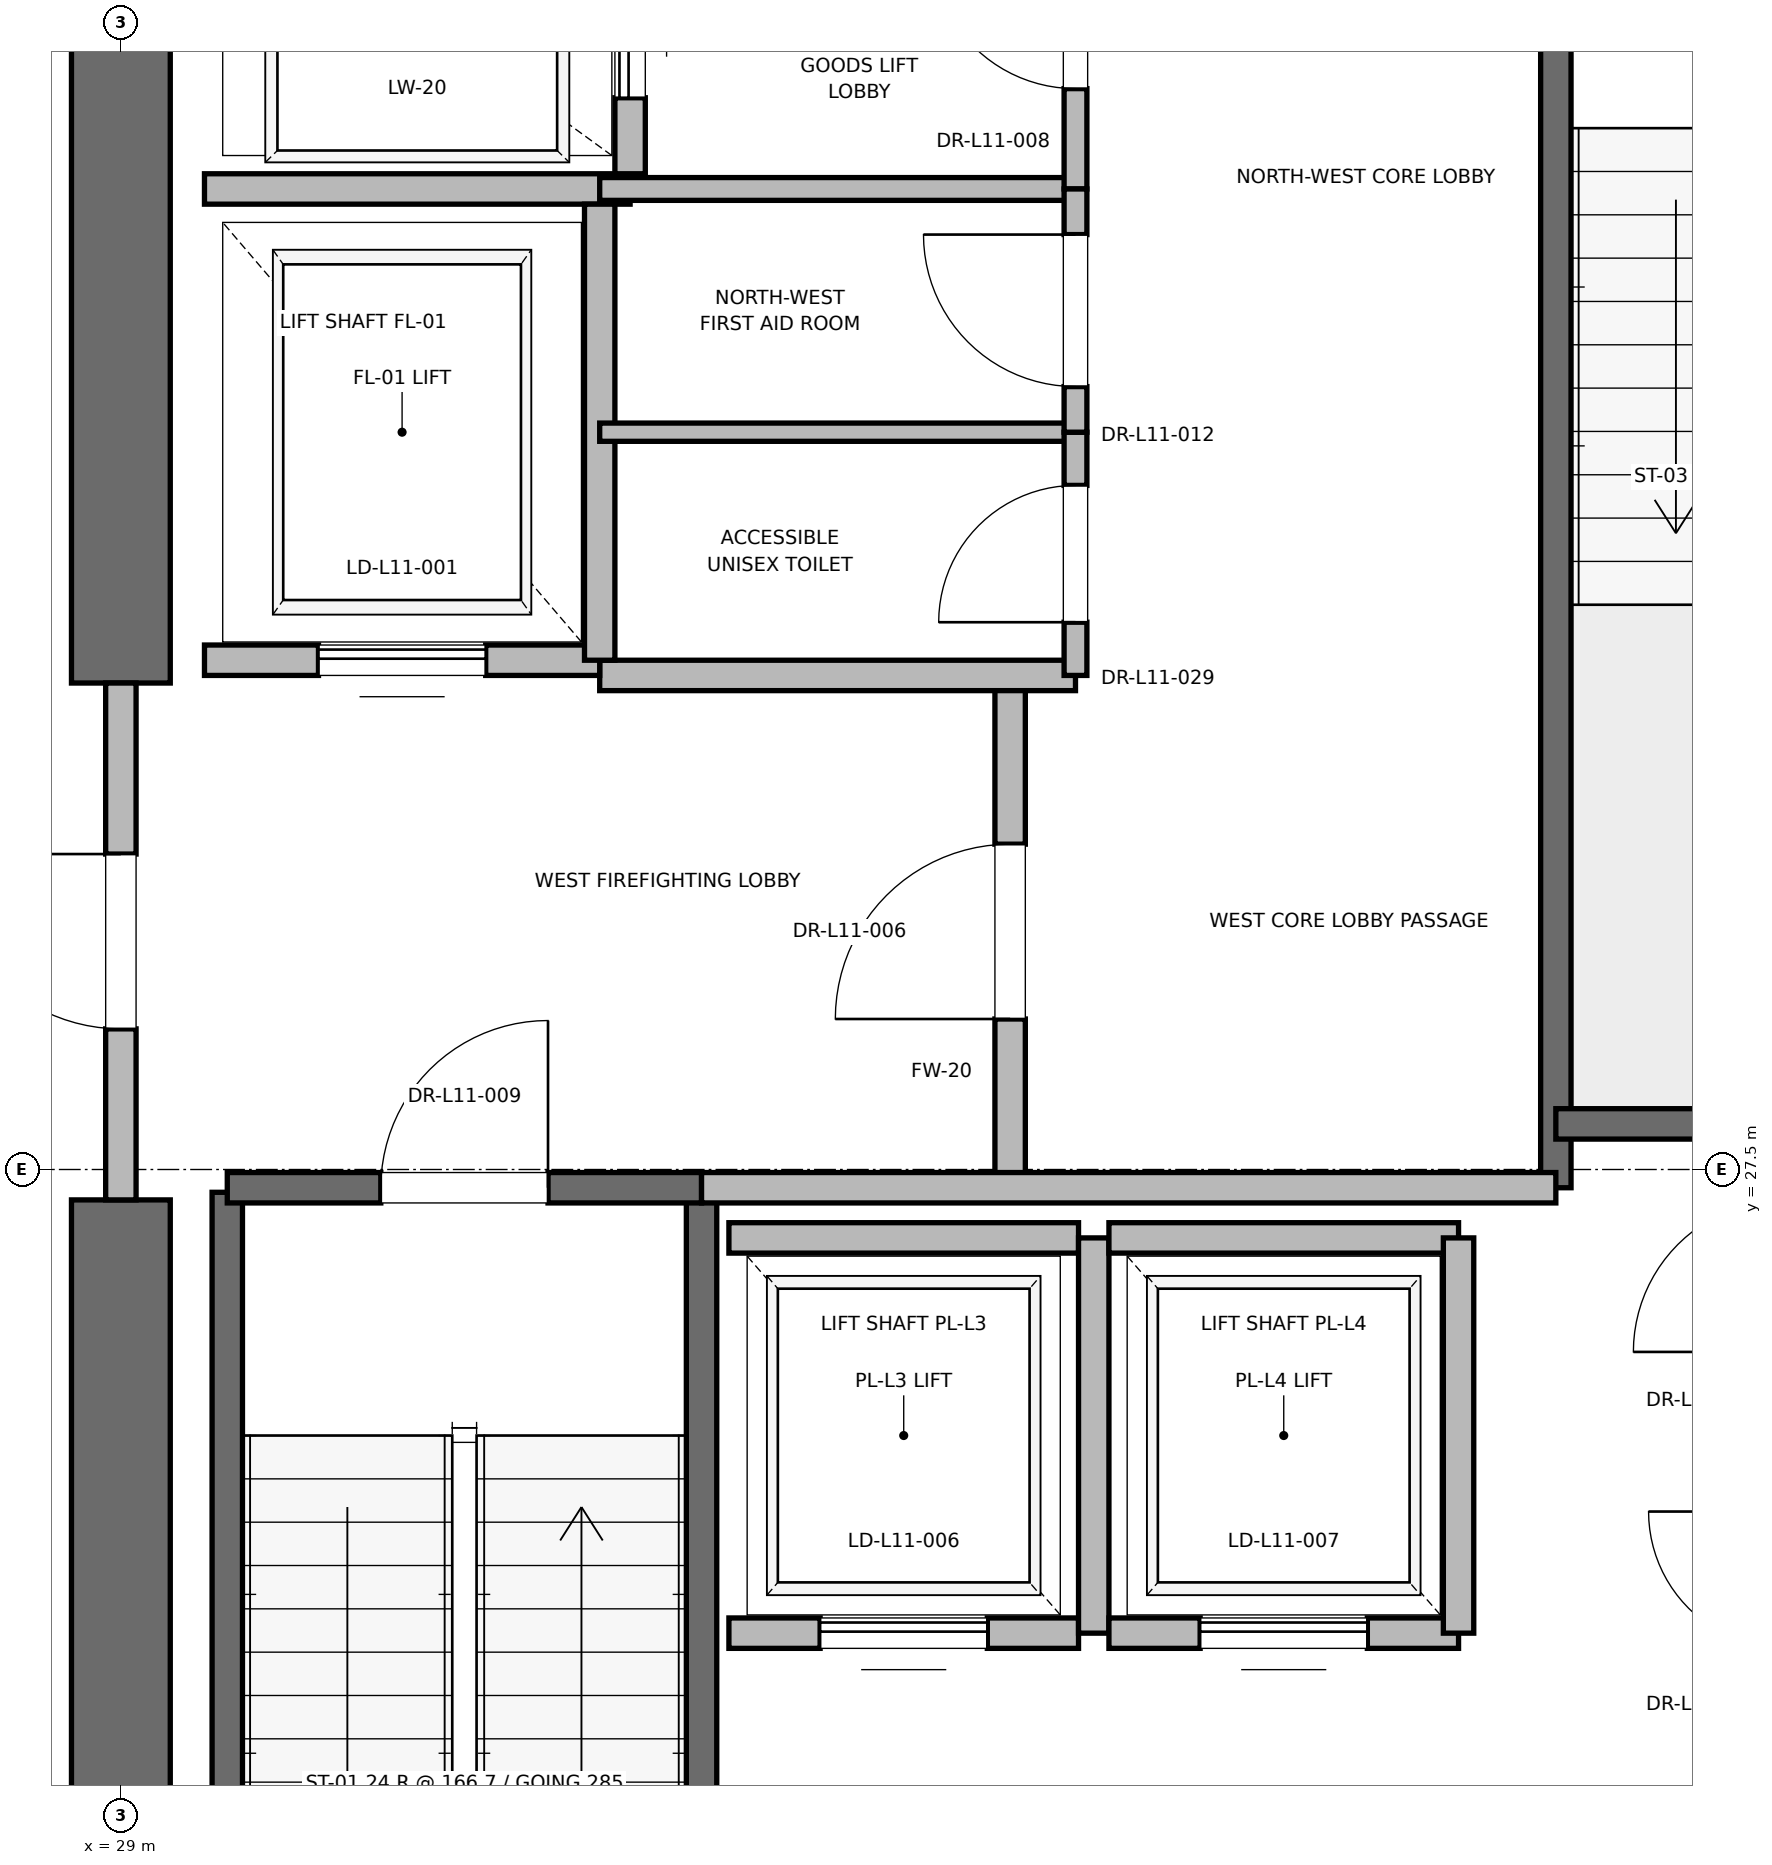
"""IFC4 building model, lengths in metres.
Left out: names, types, materials, properties, quantities, classifications, styles, units other than length and angle.
Written with IfcOpenShell. Run it as: python <this file> out.ifc"""

import sys

from ifc_helpers import new_model, si_unit, direction, frame, frame_2d, origin, place, context, subcontext, project, spatial, rectangle, extrude, element, fill, save


model = new_model("IFC4")
c1 = context("Model", 3, precision=1e-05, world=origin(), true_north=direction((0.0, 1.0)))
c2 = subcontext(c1, "Body", "Model", "MODEL_VIEW")
j1 = project(units=[si_unit("LENGTHUNIT", "METRE"), si_unit("PLANEANGLEUNIT", "RADIAN")], contexts=[c1])
p1 = place(None, origin())
s1 = spatial("IfcSite", under=j1, at=p1, CompositionType="ELEMENT")
p2 = place(p1, origin())
s2 = spatial("IfcBuilding", under=s1, at=p2, CompositionType="ELEMENT")
p3 = place(p2, frame((0.0, 0.0, 51.6)))
s3 = spatial("IfcBuildingStorey", under=s2, at=p3, CompositionType="ELEMENT", Elevation=51.6)
p4 = place(p3, frame((29.0, 18.5, 0.0), z_axis=(0.0, 0.0, 1.0), x_axis=(0.0, 1.0, 0.0)))
e1 = element("IfcWall", 1, at=p4, inside=s3, PredefinedType="SHEAR", context=c2, shape_type="SweptSolid", body=[
    extrude(rectangle(XDim=8.8, YDim=0.65, at=frame_2d((4.4, 0.0))), origin(), (0.0, 0.0, 1.0), 3.76),
])
p5 = place(p3, frame((29.0, 30.7, 0.0), z_axis=(0.0, 0.0, 1.0), x_axis=(0.0, 1.0, 0.0)))
e2 = element("IfcWall", 2, at=p5, inside=s3, PredefinedType="SHEAR", context=c2, shape_type="SweptSolid", body=[
    extrude(rectangle(XDim=5.8, YDim=0.65, at=frame_2d((2.9, 0.0))), origin(), (0.0, 0.0, 1.0), 3.76),
])
p6 = place(p3, frame((29.7, 19.2, 0.0), z_axis=(0.0, 0.0, 1.0), x_axis=(0.0, 1.0, 0.0)))
e3 = element("IfcWall", 3, at=p6, inside=s3, PredefinedType="SOLIDWALL", context=c2, shape_type="SweptSolid", body=[
    extrude(rectangle(XDim=8.15, YDim=0.2, at=frame_2d((4.075, 0.0))), origin(), (0.0, 0.0, 1.0), 3.76),
])
p7 = place(p3, frame((32.82, 18.6, 0.0), z_axis=(0.0, 0.0, 1.0), x_axis=(0.0, 1.0, 0.0)))
e4 = element("IfcWall", 4, at=p7, inside=s3, PredefinedType="SOLIDWALL", context=c2, shape_type="SweptSolid", body=[
    extrude(rectangle(XDim=8.78, YDim=0.2, at=frame_2d((4.39, 0.0))), origin(), (0.0, 0.0, 1.0), 3.76),
])
p8 = place(p3, frame((29.7, 27.38, 0.0), z_axis=(0.0, 0.0, 1.0), x_axis=(1.0, 0.0, 0.0)))
e5 = element("IfcWall", 5, at=p8, inside=s3, PredefinedType="SOLIDWALL", context=c2, shape_type="SweptSolid", body=[
    extrude(rectangle(XDim=3.12, YDim=0.2, at=frame_2d((1.56, 0.0))), origin(), (0.0, 0.0, 1.0), 3.76),
])
p9 = place(p8, frame((1.01, 0.0, 0.0)))
e6 = element("IfcOpeningElement", 6, at=p9, cuts=e5, PredefinedType="OPENING", context=c2, shape_type="SweptSolid", body=[
    extrude(rectangle(XDim=1.1, YDim=2.15, at=frame_2d((0.55, 1.075))), frame((0.0, 0.1, 0.0), z_axis=(0.0, -1.0, 0.0), x_axis=(1.0, 0.0, 0.0)), (0.0, 0.0, 1.0), 0.2),
])
p10 = place(p3, frame((38.44, 27.38, 0.0), z_axis=(0.0, 0.0, 1.0), x_axis=(0.0, 1.0, 0.0)))
e7 = element("IfcWall", 7, at=p10, inside=s3, PredefinedType="SOLIDWALL", context=c2, shape_type="SweptSolid", body=[
    extrude(rectangle(XDim=8.87, YDim=0.2, at=frame_2d((4.435, 0.0))), origin(), (0.0, 0.0, 1.0), 3.76),
])
p11 = place(p3, frame((38.44, 27.8, 0.0), z_axis=(0.0, 0.0, 1.0), x_axis=(1.0, 0.0, 0.0)))
e8 = element("IfcWall", 8, at=p11, inside=s3, PredefinedType="SOLIDWALL", context=c2, shape_type="SweptSolid", body=[
    extrude(rectangle(XDim=3.32, YDim=0.2, at=frame_2d((1.66, 0.0))), origin(), (0.0, 0.0, 1.0), 3.76),
])
p12 = place(p3, frame((34.85, 27.38, 0.0), z_axis=(0.0, 0.0, 1.0), x_axis=(0.0, 1.0, 0.0)))
e9 = element("IfcWall", 9, at=p12, inside=s3, PredefinedType="PARTITIONING", context=c2, shape_type="SweptSolid", body=[
    extrude(rectangle(XDim=3.37, YDim=0.2, at=frame_2d((1.685, 0.0))), origin(), (0.0, 0.0, 1.0), 3.76),
])
p13 = place(p12, frame((1.11, 0.0, 0.0)))
e10 = element("IfcOpeningElement", 10, at=p13, cuts=e9, PredefinedType="OPENING", context=c2, shape_type="SweptSolid", body=[
    extrude(rectangle(XDim=1.15, YDim=2.2, at=frame_2d((0.575, 1.1))), frame((0.0, 0.1, 0.0), z_axis=(0.0, -1.0, 0.0), x_axis=(1.0, 0.0, 0.0)), (0.0, 0.0, 1.0), 0.2),
])
p14 = place(p3, frame((29.0, 27.3, 0.0), z_axis=(0.0, 0.0, 1.0), x_axis=(0.0, 1.0, 0.0)))
e11 = element("IfcWall", 11, at=p14, inside=s3, PredefinedType="PARTITIONING", context=c2, shape_type="SweptSolid", body=[
    extrude(rectangle(XDim=3.4, YDim=0.2, at=frame_2d((1.7, 0.0))), origin(), (0.0, 0.0, 1.0), 2.54),
])
p15 = place(p14, frame((1.125, 0.0, 0.0)))
e12 = element("IfcOpeningElement", 12, at=p15, cuts=e11, PredefinedType="OPENING", context=c2, shape_type="SweptSolid", body=[
    extrude(rectangle(XDim=1.15, YDim=2.2, at=frame_2d((0.575, 1.1))), frame((0.0, 0.1, 0.0), z_axis=(0.0, -1.0, 0.0), x_axis=(1.0, 0.0, 0.0)), (0.0, 0.0, 1.0), 0.2),
])
p16 = place(p3, frame((32.82, 27.38, 0.0), z_axis=(0.0, 0.0, 1.0), x_axis=(1.0, 0.0, 0.0)))
e13 = element("IfcWall", 13, at=p16, inside=s3, PredefinedType="PARTITIONING", context=c2, shape_type="SweptSolid", body=[
    extrude(rectangle(XDim=5.62, YDim=0.2, at=frame_2d((2.81, 0.0))), origin(), (0.0, 0.0, 1.0), 3.76),
])
p17 = place(p3, frame((32.15, 30.75, 0.0), z_axis=(0.0, 0.0, 1.0), x_axis=(1.0, 0.0, 0.0)))
e14 = element("IfcWall", 14, at=p17, inside=s3, PredefinedType="PARTITIONING", context=c2, shape_type="SweptSolid", body=[
    extrude(rectangle(XDim=3.13, YDim=0.2, at=frame_2d((1.565, 0.0))), origin(), (0.0, 0.0, 1.0), 3.76),
])
p18 = place(p3, frame((29.55, 30.85, 0.0), z_axis=(0.0, 0.0, 1.0), x_axis=(1.0, 0.0, 0.0)))
e15 = element("IfcWall", 15, at=p18, inside=s3, PredefinedType="SOLIDWALL", context=c2, shape_type="SweptSolid", body=[
    extrude(rectangle(XDim=2.6, YDim=0.2, at=frame_2d((1.3, 0.0))), origin(), (0.0, 0.0, 1.0), 2.54),
])
p19 = place(p18, frame((0.75, 0.0, 0.0)))
e16 = element("IfcOpeningElement", 16, at=p19, cuts=e15, PredefinedType="OPENING", context=c2, shape_type="SweptSolid", body=[
    extrude(rectangle(XDim=1.1, YDim=2.2, at=frame_2d((0.55, 1.1))), frame((0.0, 0.1, 0.0), z_axis=(0.0, -1.0, 0.0), x_axis=(1.0, 0.0, 0.0)), (0.0, 0.0, 1.0), 0.2),
])
p20 = place(p3, frame((29.55, 33.95, 0.0), z_axis=(0.0, 0.0, 1.0), x_axis=(1.0, 0.0, 0.0)))
e17 = element("IfcWall", 17, at=p20, inside=s3, PredefinedType="SOLIDWALL", context=c2, shape_type="SweptSolid", body=[
    extrude(rectangle(XDim=2.8, YDim=0.2, at=frame_2d((1.4, 0.0))), origin(), (0.0, 0.0, 1.0), 3.76),
])
p21 = place(p3, frame((32.15, 30.85, 0.0), z_axis=(0.0, 0.0, 1.0), x_axis=(0.0, 1.0, 0.0)))
e18 = element("IfcWall", 18, at=p21, inside=s3, PredefinedType="SOLIDWALL", context=c2, shape_type="SweptSolid", body=[
    extrude(rectangle(XDim=3.0, YDim=0.2, at=frame_2d((1.5, 0.0))), origin(), (0.0, 0.0, 1.0), 3.76),
])
p22 = place(p3, frame((32.35, 34.05, 0.0), z_axis=(0.0, 0.0, 1.0), x_axis=(0.0, 1.0, 0.0)))
e19 = element("IfcWall", 19, at=p22, inside=s3, PredefinedType="SOLIDWALL", context=c2, shape_type="SweptSolid", body=[
    extrude(rectangle(XDim=2.1, YDim=0.2, at=frame_2d((1.05, 0.0))), origin(), (0.0, 0.0, 1.0), 3.76),
])
p23 = place(p22, frame((0.5, 0.0, 0.0)))
e20 = element("IfcOpeningElement", 20, at=p23, cuts=e19, PredefinedType="OPENING", context=c2, shape_type="SweptSolid", body=[
    extrude(rectangle(XDim=1.1, YDim=2.2, at=frame_2d((0.55, 1.1))), frame((0.0, 0.1, 0.0), z_axis=(0.0, -1.0, 0.0), x_axis=(1.0, 0.0, 0.0)), (0.0, 0.0, 1.0), 0.2),
])
p24 = place(p3, frame((33.0, 24.45, 0.0), z_axis=(0.0, 0.0, 1.0), x_axis=(1.0, 0.0, 0.0)))
e21 = element("IfcWall", 21, at=p24, inside=s3, PredefinedType="SOLIDWALL", context=c2, shape_type="SweptSolid", body=[
    extrude(rectangle(XDim=2.3, YDim=0.2, at=frame_2d((1.15, 0.0))), origin(), (0.0, 0.0, 1.0), 3.76),
])
p25 = place(p24, frame((0.6, 0.0, 0.0)))
e22 = element("IfcOpeningElement", 22, at=p25, cuts=e21, PredefinedType="OPENING", context=c2, shape_type="SweptSolid", body=[
    extrude(rectangle(XDim=1.1, YDim=2.2, at=frame_2d((0.55, 1.1))), frame((0.0, 0.1, 0.0), z_axis=(0.0, -1.0, 0.0), x_axis=(1.0, 0.0, 0.0)), (0.0, 0.0, 1.0), 0.2),
])
p26 = place(p3, frame((35.3, 27.05, 0.0), z_axis=(0.0, 0.0, 1.0), x_axis=(-1.0, 0.0, 0.0)))
e23 = element("IfcWall", 23, at=p26, inside=s3, PredefinedType="SOLIDWALL", context=c2, shape_type="SweptSolid", body=[
    extrude(rectangle(XDim=2.3, YDim=0.2, at=frame_2d((1.15, 0.0))), origin(), (0.0, 0.0, 1.0), 3.76),
])
p27 = place(p3, frame((35.4, 24.45, 0.0), z_axis=(0.0, 0.0, 1.0), x_axis=(0.0, 1.0, 0.0)))
e24 = element("IfcWall", 24, at=p27, inside=s3, PredefinedType="SOLIDWALL", context=c2, shape_type="SweptSolid", body=[
    extrude(rectangle(XDim=2.6, YDim=0.2, at=frame_2d((1.3, 0.0))), origin(), (0.0, 0.0, 1.0), 3.76),
])
p28 = place(p3, frame((35.5, 24.45, 0.0), z_axis=(0.0, 0.0, 1.0), x_axis=(1.0, 0.0, 0.0)))
e25 = element("IfcWall", 25, at=p28, inside=s3, PredefinedType="SOLIDWALL", context=c2, shape_type="SweptSolid", body=[
    extrude(rectangle(XDim=2.3, YDim=0.2, at=frame_2d((1.15, 0.0))), origin(), (0.0, 0.0, 1.0), 3.76),
])
p29 = place(p28, frame((0.6, 0.0, 0.0)))
e26 = element("IfcOpeningElement", 26, at=p29, cuts=e25, PredefinedType="OPENING", context=c2, shape_type="SweptSolid", body=[
    extrude(rectangle(XDim=1.1, YDim=2.2, at=frame_2d((0.55, 1.1))), frame((0.0, 0.1, 0.0), z_axis=(0.0, -1.0, 0.0), x_axis=(1.0, 0.0, 0.0)), (0.0, 0.0, 1.0), 0.2),
])
p30 = place(p3, frame((37.8, 27.05, 0.0), z_axis=(0.0, 0.0, 1.0), x_axis=(-1.0, 0.0, 0.0)))
e27 = element("IfcWall", 27, at=p30, inside=s3, PredefinedType="SOLIDWALL", context=c2, shape_type="SweptSolid", body=[
    extrude(rectangle(XDim=2.3, YDim=0.2, at=frame_2d((1.15, 0.0))), origin(), (0.0, 0.0, 1.0), 3.76),
])
p31 = place(p3, frame((37.8, 24.45, 0.0), z_axis=(0.0, 0.0, 1.0), x_axis=(0.0, 1.0, 0.0)))
e28 = element("IfcWall", 28, at=p31, inside=s3, PredefinedType="SOLIDWALL", context=c2, shape_type="SweptSolid", body=[
    extrude(rectangle(XDim=2.6, YDim=0.2, at=frame_2d((1.3, 0.0))), origin(), (0.0, 0.0, 1.0), 3.76),
])
p32 = place(p3, frame((32.15, 33.95, 0.0), z_axis=(0.0, 0.0, 1.0), x_axis=(1.0, 0.0, 0.0)))
e29 = element("IfcWall", 29, at=p32, inside=s3, PredefinedType="PARTITIONING", context=c2, shape_type="SweptSolid", body=[
    extrude(rectangle(XDim=3.13, YDim=0.15, at=frame_2d((1.565, 0.0))), origin(), (0.0, 0.0, 1.0), 2.85),
])
p33 = place(p3, frame((35.28, 33.95, 0.0), z_axis=(0.0, 0.0, 1.0), x_axis=(0.0, 1.0, 0.0)))
e30 = element("IfcWall", 30, at=p33, inside=s3, PredefinedType="PARTITIONING", context=c2, shape_type="SweptSolid", body=[
    extrude(rectangle(XDim=2.27, YDim=0.15, at=frame_2d((1.135, 0.0))), origin(), (0.0, 0.0, 1.0), 2.54),
])
p34 = place(p33, frame((0.66, 0.0, 0.0)))
e31 = element("IfcOpeningElement", 31, at=p34, cuts=e30, PredefinedType="OPENING", context=c2, shape_type="SweptSolid", body=[
    extrude(rectangle(XDim=0.95, YDim=2.15, at=frame_2d((0.475, 1.075))), frame((0.0, 0.075, 0.0), z_axis=(0.0, -1.0, 0.0), x_axis=(1.0, 0.0, 0.0)), (0.0, 0.0, 1.0), 0.15),
])
p35 = place(p3, frame((32.15, 32.35, 0.0), z_axis=(0.0, 0.0, 1.0), x_axis=(1.0, 0.0, 0.0)))
e32 = element("IfcWall", 32, at=p35, inside=s3, PredefinedType="PARTITIONING", context=c2, shape_type="SweptSolid", body=[
    extrude(rectangle(XDim=3.13, YDim=0.12, at=frame_2d((1.565, 0.0))), origin(), (0.0, 0.0, 1.0), 2.85),
])
p36 = place(p3, frame((35.28, 30.75, 0.0), z_axis=(0.0, 0.0, 1.0), x_axis=(0.0, 1.0, 0.0)))
e33 = element("IfcWall", 33, at=p36, inside=s3, PredefinedType="PARTITIONING", context=c2, shape_type="SweptSolid", body=[
    extrude(rectangle(XDim=1.6, YDim=0.15, at=frame_2d((0.8, 0.0))), origin(), (0.0, 0.0, 1.0), 2.85),
])
p37 = place(p36, frame((0.35, 0.0, 0.0)))
e34 = element("IfcOpeningElement", 34, at=p37, cuts=e33, PredefinedType="OPENING", context=c2, shape_type="SweptSolid", body=[
    extrude(rectangle(XDim=0.9, YDim=2.1, at=frame_2d((0.45, 1.05))), frame((0.0, 0.075, 0.0), z_axis=(0.0, -1.0, 0.0), x_axis=(1.0, 0.0, 0.0)), (0.0, 0.0, 1.0), 0.15),
])
p38 = place(p3, frame((35.28, 32.35, 0.0), z_axis=(0.0, 0.0, 1.0), x_axis=(0.0, 1.0, 0.0)))
e35 = element("IfcWall", 35, at=p38, inside=s3, PredefinedType="PARTITIONING", context=c2, shape_type="SweptSolid", body=[
    extrude(rectangle(XDim=1.6, YDim=0.15, at=frame_2d((0.8, 0.0))), origin(), (0.0, 0.0, 1.0), 2.85),
])
p39 = place(p38, frame((0.3, 0.0, 0.0)))
e36 = element("IfcOpeningElement", 36, at=p39, cuts=e35, PredefinedType="OPENING", context=c2, shape_type="SweptSolid", body=[
    extrude(rectangle(XDim=1.0, YDim=2.15, at=frame_2d((0.5, 1.075))), frame((0.0, 0.075, 0.0), z_axis=(0.0, -1.0, 0.0), x_axis=(1.0, 0.0, 0.0)), (0.0, 0.0, 1.0), 0.15),
])
p40 = place(p9, origin())
e37 = element("IfcDoor", 37, at=p40, inside=s3, OperationType="SINGLE_SWING_RIGHT", PredefinedType="DOOR", context=c2, shape_type="SweptSolid", body=[
    extrude(rectangle(XDim=1.1, YDim=2.15, at=frame_2d((0.55, 1.075))), frame((0.0, 0.025, 0.0), z_axis=(0.0, -1.0, 0.0), x_axis=(1.0, 0.0, 0.0)), (0.0, 0.0, 1.0), 0.05),
])
fill(e6, e37)
p41 = place(p13, origin())
e38 = element("IfcDoor", 38, at=p41, inside=s3, OperationType="SINGLE_SWING_LEFT", PredefinedType="DOOR", context=c2, shape_type="SweptSolid", body=[
    extrude(rectangle(XDim=1.15, YDim=2.2, at=frame_2d((0.575, 1.1))), frame((0.0, 0.025, 0.0), z_axis=(0.0, -1.0, 0.0), x_axis=(1.0, 0.0, 0.0)), (0.0, 0.0, 1.0), 0.05),
])
fill(e10, e38)
p42 = place(p15, origin())
e39 = element("IfcDoor", 39, at=p42, inside=s3, OperationType="SINGLE_SWING_RIGHT", PredefinedType="DOOR", context=c2, shape_type="SweptSolid", body=[
    extrude(rectangle(XDim=1.15, YDim=2.2, at=frame_2d((0.575, 1.1))), frame((0.0, 0.025, 0.0), z_axis=(0.0, -1.0, 0.0), x_axis=(1.0, 0.0, 0.0)), (0.0, 0.0, 1.0), 0.05),
])
fill(e12, e39)
p43 = place(p19, origin())
e40 = element("IfcDoor", 40, at=p43, inside=s3, OperationType="SLIDING_TO_RIGHT", PredefinedType="DOOR", context=c2, shape_type="SweptSolid", body=[
    extrude(rectangle(XDim=1.1, YDim=2.2, at=frame_2d((0.55, 1.1))), frame((0.0, 0.025, 0.0), z_axis=(0.0, -1.0, 0.0), x_axis=(1.0, 0.0, 0.0)), (0.0, 0.0, 1.0), 0.05),
])
fill(e16, e40)
p44 = place(p23, origin())
e41 = element("IfcDoor", 41, at=p44, inside=s3, OperationType="SLIDING_TO_RIGHT", PredefinedType="DOOR", context=c2, shape_type="SweptSolid", body=[
    extrude(rectangle(XDim=1.1, YDim=2.2, at=frame_2d((0.55, 1.1))), frame((0.0, 0.025, 0.0), z_axis=(0.0, -1.0, 0.0), x_axis=(1.0, 0.0, 0.0)), (0.0, 0.0, 1.0), 0.05),
])
fill(e20, e41)
p45 = place(p25, origin())
e42 = element("IfcDoor", 42, at=p45, inside=s3, OperationType="SLIDING_TO_RIGHT", PredefinedType="DOOR", context=c2, shape_type="SweptSolid", body=[
    extrude(rectangle(XDim=1.1, YDim=2.2, at=frame_2d((0.55, 1.1))), frame((0.0, 0.025, 0.0), z_axis=(0.0, -1.0, 0.0), x_axis=(1.0, 0.0, 0.0)), (0.0, 0.0, 1.0), 0.05),
])
fill(e22, e42)
p46 = place(p29, origin())
e43 = element("IfcDoor", 43, at=p46, inside=s3, OperationType="SLIDING_TO_RIGHT", PredefinedType="DOOR", context=c2, shape_type="SweptSolid", body=[
    extrude(rectangle(XDim=1.1, YDim=2.2, at=frame_2d((0.55, 1.1))), frame((0.0, 0.025, 0.0), z_axis=(0.0, -1.0, 0.0), x_axis=(1.0, 0.0, 0.0)), (0.0, 0.0, 1.0), 0.05),
])
fill(e26, e43)
p47 = place(p34, origin())
e44 = element("IfcDoor", 44, at=p47, inside=s3, OperationType="SINGLE_SWING_RIGHT", PredefinedType="DOOR", context=c2, shape_type="SweptSolid", body=[
    extrude(rectangle(XDim=0.95, YDim=2.15, at=frame_2d((0.475, 1.075))), frame((0.0, 0.025, 0.0), z_axis=(0.0, -1.0, 0.0), x_axis=(1.0, 0.0, 0.0)), (0.0, 0.0, 1.0), 0.05),
])
fill(e31, e44)
p48 = place(p37, origin())
e45 = element("IfcDoor", 45, at=p48, inside=s3, OperationType="SINGLE_SWING_LEFT", PredefinedType="DOOR", context=c2, shape_type="SweptSolid", body=[
    extrude(rectangle(XDim=0.9, YDim=2.1, at=frame_2d((0.45, 1.05))), frame((0.0, 0.025, 0.0), z_axis=(0.0, -1.0, 0.0), x_axis=(1.0, 0.0, 0.0)), (0.0, 0.0, 1.0), 0.05),
])
fill(e34, e45)
p49 = place(p39, origin())
e46 = element("IfcDoor", 46, at=p49, inside=s3, OperationType="SINGLE_SWING_RIGHT", PredefinedType="DOOR", context=c2, shape_type="SweptSolid", body=[
    extrude(rectangle(XDim=1.0, YDim=2.15, at=frame_2d((0.5, 1.075))), frame((0.0, 0.025, 0.0), z_axis=(0.0, -1.0, 0.0), x_axis=(1.0, 0.0, 0.0)), (0.0, 0.0, 1.0), 0.05),
])
fill(e36, e46)
save(model, sys.argv[1])
